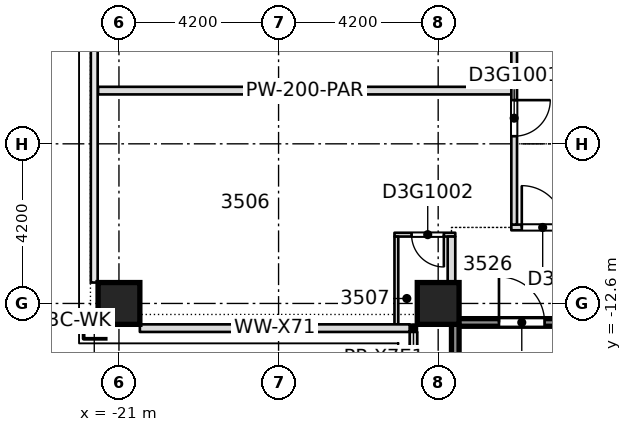
"""IFC4 building model, lengths in metres.
Left out: names, types, materials, properties, quantities, classifications, styles, units other than length and angle.
Written with IfcOpenShell. Run it as: python <this file> out.ifc"""

import sys

from ifc_helpers import new_model, si_unit, direction, frame, frame_2d, origin, origin_2d, place, context, subcontext, project, spatial, rectangle, extrude, element, fill, save


model = new_model("IFC4")
c1 = context("Model", 3, precision=1e-05, world=origin(), true_north=direction((0.0, 1.0)))
c2 = subcontext(c1, "Body", "Model", "MODEL_VIEW")
j1 = project(units=[si_unit("LENGTHUNIT", "METRE"), si_unit("PLANEANGLEUNIT", "RADIAN")], contexts=[c1])
p1 = place(None, origin())
s1 = spatial("IfcSite", under=j1, at=p1, CompositionType="ELEMENT")
p2 = place(p1, origin())
s2 = spatial("IfcBuilding", under=s1, at=p2, CompositionType="ELEMENT")
p3 = place(p2, frame((0.0, 0.0, 140.0)))
s3 = spatial("IfcBuildingStorey", under=s2, at=p3, CompositionType="ELEMENT", Elevation=140.0)
for number, where, z_axis, x_axis in (
    (1, (-21.0, -12.6, -0.4), (0.0, 0.0, 1.0), (1.0, 0.0, 0.0)),
    (2, (-12.6, -12.6, -0.4), (0.0, 0.0, 1.0), (1.0, 0.0, 0.0)),
):
    element("IfcColumn", number, at=place(p3, frame(where, z_axis=z_axis, x_axis=x_axis)), inside=s3, PredefinedType="COLUMN", context=c2, shape_type="SweptSolid", body=[
        extrude(rectangle(XDim=1.1, YDim=1.1, at=origin_2d()), origin(), (0.0, 0.0, 1.0), 3.45),
    ])
p4 = place(p3, frame((-12.15, -13.1, 0.0), z_axis=(0.0, 0.0, 1.0), x_axis=(1.0, 0.0, 0.0)))
e3 = element("IfcWall", 3, at=p4, inside=s3, PredefinedType="SOLIDWALL", context=c2, shape_type="SweptSolid", body=[
    extrude(rectangle(XDim=3.5, YDim=0.2, at=frame_2d((1.75, 0.0))), origin(), (0.0, 0.0, 1.0), 3.05),
])
p5 = place(p4, frame((1.15, 0.0, 0.0)))
e4 = element("IfcOpeningElement", 4, at=p5, cuts=e3, PredefinedType="OPENING", context=c2, shape_type="SweptSolid", body=[
    extrude(rectangle(XDim=1.2, YDim=2.1, at=frame_2d((0.6, 1.05))), frame((0.0, 0.11, 0.0), z_axis=(0.0, -1.0, 0.0), x_axis=(1.0, 0.0, 0.0)), (0.0, 0.0, 1.0), 0.22),
])
p6 = place(p3, frame((-13.75, -10.79, 0.0), z_axis=(0.0, 0.0, 1.0), x_axis=(1.0, 0.0, 0.0)))
e5 = element("IfcWall", 5, at=p6, inside=s3, PredefinedType="PARTITIONING", context=c2, shape_type="SweptSolid", body=[
    extrude(rectangle(XDim=1.6, YDim=0.1, at=frame_2d((0.8, 0.0))), origin(), (0.0, 0.0, 1.0), 3.05),
])
p7 = place(p6, frame((0.45, 0.0, 0.0)))
e6 = element("IfcOpeningElement", 6, at=p7, cuts=e5, PredefinedType="OPENING", context=c2, shape_type="SweptSolid", body=[
    extrude(rectangle(XDim=0.85, YDim=2.1, at=frame_2d((0.425, 1.05))), frame((0.0, 0.06, 0.0), z_axis=(0.0, -1.0, 0.0), x_axis=(1.0, 0.0, 0.0)), (0.0, 0.0, 1.0), 0.12),
])
p8 = place(p3, frame((-10.675, -10.6, 0.0), z_axis=(0.0, 0.0, 1.0), x_axis=(1.0, 0.0, 0.0)))
e7 = element("IfcWall", 7, at=p8, inside=s3, PredefinedType="PARTITIONING", context=c2, shape_type="SweptSolid", body=[
    extrude(rectangle(XDim=6.775, YDim=0.15, at=frame_2d((3.388, 0.0))), origin(), (0.0, 0.0, 1.0), 3.05),
])
p9 = place(p8, frame((3.95, 0.0, 0.0)))
e8 = element("IfcOpeningElement", 8, at=p9, cuts=e7, PredefinedType="OPENING", context=c2, shape_type="SweptSolid", body=[
    extrude(rectangle(XDim=0.95, YDim=2.1, at=frame_2d((0.475, 1.05))), frame((0.0, 0.085, 0.0), z_axis=(0.0, -1.0, 0.0), x_axis=(1.0, 0.0, 0.0)), (0.0, 0.0, 1.0), 0.17),
])
p10 = place(p8, frame((0.275, 0.0, 0.0)))
e9 = element("IfcOpeningElement", 9, at=p10, cuts=e7, PredefinedType="OPENING", context=c2, shape_type="SweptSolid", body=[
    extrude(rectangle(XDim=1.1, YDim=2.1, at=frame_2d((0.55, 1.05))), frame((0.0, 0.085, 0.0), z_axis=(0.0, -1.0, 0.0), x_axis=(1.0, 0.0, 0.0)), (0.0, 0.0, 1.0), 0.17),
])
p11 = place(p3, frame((-21.55, -7.0, 0.0), z_axis=(0.0, 0.0, 1.0), x_axis=(1.0, 0.0, 0.0)))
e10 = element("IfcWall", 10, at=p11, inside=s3, PredefinedType="PARTITIONING", context=c2, shape_type="SweptSolid", body=[
    extrude(rectangle(XDim=10.875, YDim=0.2, at=frame_2d((5.438, 0.0))), origin(), (0.0, 0.0, 1.0), 3.05),
])
p12 = place(p3, frame((-13.7, -13.15, 0.0), z_axis=(0.0, 0.0, 1.0), x_axis=(0.0, 1.0, 0.0)))
e11 = element("IfcWall", 11, at=p12, inside=s3, PredefinedType="PARTITIONING", context=c2, shape_type="SweptSolid", body=[
    extrude(rectangle(XDim=2.31, YDim=0.1, at=frame_2d((1.155, 0.0))), origin(), (0.0, 0.0, 1.0), 3.05),
])
p13 = place(p3, frame((-12.25, -12.89, 0.0), z_axis=(0.0, 0.0, 1.0), x_axis=(0.0, 1.0, 0.0)))
e12 = element("IfcWall", 12, at=p13, inside=s3, PredefinedType="PARTITIONING", context=c2, shape_type="SweptSolid", body=[
    extrude(rectangle(XDim=2.05, YDim=0.2, at=frame_2d((1.025, 0.0))), origin(), (0.0, 0.0, 1.0), 3.05),
])
p14 = place(p3, frame((-10.6, -10.525, 0.0), z_axis=(0.0, 0.0, 1.0), x_axis=(0.0, 1.0, 0.0)))
e13 = element("IfcWall", 13, at=p14, inside=s3, PredefinedType="PARTITIONING", context=c2, shape_type="SweptSolid", body=[
    extrude(rectangle(XDim=13.875, YDim=0.15, at=frame_2d((6.938, 0.0))), origin(), (0.0, 0.0, 1.0), 3.05),
])
p15 = place(p14, frame((2.325, 0.0, 0.0)))
e14 = element("IfcOpeningElement", 14, at=p15, cuts=e13, PredefinedType="OPENING", context=c2, shape_type="SweptSolid", body=[
    extrude(rectangle(XDim=0.95, YDim=2.1, at=frame_2d((0.475, 1.05))), frame((0.0, 0.085, 0.0), z_axis=(0.0, -1.0, 0.0), x_axis=(1.0, 0.0, 0.0)), (0.0, 0.0, 1.0), 0.17),
])
p16 = place(p14, frame((9.975, 0.0, 0.0)))
e15 = element("IfcOpeningElement", 15, at=p16, cuts=e13, PredefinedType="OPENING", context=c2, shape_type="SweptSolid", body=[
    extrude(rectangle(XDim=1.1, YDim=2.1, at=frame_2d((0.55, 1.05))), frame((0.0, 0.085, 0.0), z_axis=(0.0, -1.0, 0.0), x_axis=(1.0, 0.0, 0.0)), (0.0, 0.0, 1.0), 0.17),
])
p17 = place(p14, frame((4.825, 0.0, 0.0)))
e16 = element("IfcOpeningElement", 16, at=p17, cuts=e13, PredefinedType="OPENING", context=c2, shape_type="SweptSolid", body=[
    extrude(rectangle(XDim=1.0, YDim=2.1, at=frame_2d((0.5, 1.05))), frame((0.0, 0.085, 0.0), z_axis=(0.0, -1.0, 0.0), x_axis=(1.0, 0.0, 0.0)), (0.0, 0.0, 1.0), 0.17),
])
p18 = place(p14, frame((12.225, 0.0, 0.0)))
e17 = element("IfcOpeningElement", 17, at=p18, cuts=e13, PredefinedType="OPENING", context=c2, shape_type="SweptSolid", body=[
    extrude(rectangle(XDim=1.0, YDim=2.1, at=frame_2d((0.5, 1.05))), frame((0.0, 0.085, 0.0), z_axis=(0.0, -1.0, 0.0), x_axis=(1.0, 0.0, 0.0)), (0.0, 0.0, 1.0), 0.17),
])
p19 = place(p3, frame((-20.45, -13.25, 0.0), z_axis=(0.0, 0.0, 1.0), x_axis=(1.0, 0.0, 0.0)))
e18 = element("IfcWall", 18, at=p19, inside=s3, PredefinedType="STANDARD", context=c2, shape_type="SweptSolid", body=[
    extrude(rectangle(XDim=7.1, YDim=0.2, at=frame_2d((3.55, 0.0))), origin(), (0.0, 0.0, 1.0), 3.05),
])
p20 = place(p3, frame((-13.25, -13.35, 0.0), z_axis=(0.0, 0.0, 1.0), x_axis=(0.0, -1.0, 0.0)))
e19 = element("IfcWall", 19, at=p20, inside=s3, PredefinedType="STANDARD", context=c2, shape_type="SweptSolid", body=[
    extrude(rectangle(XDim=7.1, YDim=0.2, at=frame_2d((3.55, 0.0))), origin(), (0.0, 0.0, 1.0), 3.05),
])
p21 = place(p20, frame((4.375, 0.0, 0.2)))
e20 = element("IfcOpeningElement", 20, at=p21, cuts=e19, PredefinedType="OPENING", context=c2, shape_type="SweptSolid", body=[
    extrude(rectangle(XDim=1.8, YDim=2.65, at=frame_2d((0.9, 1.325))), frame((0.0, 0.11, 0.0), z_axis=(0.0, -1.0, 0.0), x_axis=(1.0, 0.0, 0.0)), (0.0, 0.0, 1.0), 0.22),
])
p22 = place(p20, frame((0.825, 0.0, 0.2)))
e21 = element("IfcOpeningElement", 21, at=p22, cuts=e19, PredefinedType="OPENING", context=c2, shape_type="SweptSolid", body=[
    extrude(rectangle(XDim=1.8, YDim=2.65, at=frame_2d((0.9, 1.325))), frame((0.0, 0.11, 0.0), z_axis=(0.0, -1.0, 0.0), x_axis=(1.0, 0.0, 0.0)), (0.0, 0.0, 1.0), 0.22),
])
p23 = place(p3, frame((-12.15, -20.45, 0.0), z_axis=(0.0, 0.0, 1.0), x_axis=(0.0, 1.0, 0.0)))
e22 = element("IfcWall", 22, at=p23, inside=s3, PredefinedType="SOLIDWALL", context=c2, shape_type="SweptSolid", body=[
    extrude(rectangle(XDim=7.3, YDim=0.2, at=frame_2d((3.65, 0.0))), origin(), (0.0, 0.0, 1.0), 3.05),
])
p24 = place(p15, origin())
e23 = element("IfcDoor", 23, at=p24, inside=s3, OperationType="SINGLE_SWING_RIGHT", PredefinedType="DOOR", context=c2, shape_type="SweptSolid", body=[
    extrude(rectangle(XDim=0.95, YDim=2.1, at=frame_2d((0.475, 1.05))), frame((0.0, 0.025, 0.0), z_axis=(0.0, -1.0, 0.0), x_axis=(1.0, 0.0, 0.0)), (0.0, 0.0, 1.0), 0.05),
])
fill(e14, e23)
p25 = place(p7, origin())
e24 = element("IfcDoor", 24, at=p25, inside=s3, OperationType="SINGLE_SWING_RIGHT", PredefinedType="DOOR", context=c2, shape_type="SweptSolid", body=[
    extrude(rectangle(XDim=0.85, YDim=2.1, at=frame_2d((0.425, 1.05))), frame((0.0, 0.025, 0.0), z_axis=(0.0, -1.0, 0.0), x_axis=(1.0, 0.0, 0.0)), (0.0, 0.0, 1.0), 0.05),
])
fill(e6, e24)
p26 = place(p10, origin())
e25 = element("IfcDoor", 25, at=p26, inside=s3, OperationType="SINGLE_SWING_RIGHT", PredefinedType="DOOR", context=c2, shape_type="SweptSolid", body=[
    extrude(rectangle(XDim=1.1, YDim=2.1, at=frame_2d((0.55, 1.05))), frame((0.0, 0.025, 0.0), z_axis=(0.0, -1.0, 0.0), x_axis=(1.0, 0.0, 0.0)), (0.0, 0.0, 1.0), 0.05),
])
fill(e9, e25)
p27 = place(p5, origin())
e26 = element("IfcDoor", 26, at=p27, inside=s3, OperationType="SINGLE_SWING_RIGHT", PredefinedType="DOOR", context=c2, shape_type="SweptSolid", body=[
    extrude(rectangle(XDim=1.2, YDim=2.1, at=frame_2d((0.6, 1.05))), frame((0.0, 0.025, 0.0), z_axis=(0.0, -1.0, 0.0), x_axis=(1.0, 0.0, 0.0)), (0.0, 0.0, 1.0), 0.05),
])
fill(e4, e26)
save(model, sys.argv[1])
